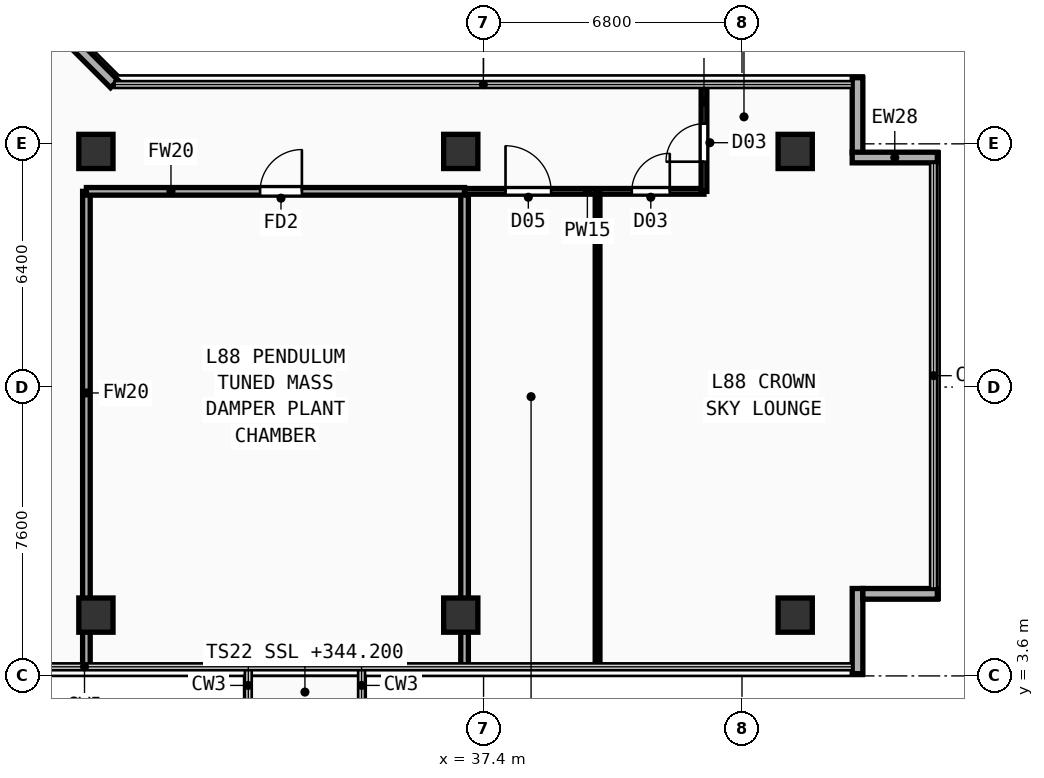
"""IFC4 building model, lengths in metres.
Left out: names, types, materials, properties, quantities, classifications, styles, units other than length and angle.
Written with IfcOpenShell. Run it as: python <this file> out.ifc"""

import sys

from ifc_helpers import new_model, si_unit, direction, frame, frame_2d, origin, origin_2d, place, context, subcontext, project, spatial, rectangle, extrude, element, fill, save


model = new_model("IFC4")
c1 = context("Model", 3, precision=1e-05, world=origin(), true_north=direction((0.0, 1.0)))
c2 = subcontext(c1, "Body", "Model", "MODEL_VIEW")
j1 = project(units=[si_unit("LENGTHUNIT", "METRE"), si_unit("PLANEANGLEUNIT", "RADIAN")], contexts=[c1])
p1 = place(None, origin())
s1 = spatial("IfcSite", under=j1, at=p1, CompositionType="ELEMENT")
p2 = place(p1, origin())
s2 = spatial("IfcBuilding", under=s1, at=p2, CompositionType="ELEMENT")
p3 = place(p2, frame((0.0, 0.0, 344.2)))
s3 = spatial("IfcBuildingStorey", under=s2, at=p3, CompositionType="ELEMENT", Elevation=344.2)
for number, where, z_axis, x_axis in (
    (1, (27.2, 5.2, 0.0), (0.0, 0.0, 1.0), (1.0, 0.0, 0.0)),
    (2, (36.8, 5.2, 0.0), (0.0, 0.0, 1.0), (1.0, 0.0, 0.0)),
    (3, (45.6, 5.2, 0.0), (0.0, 0.0, 1.0), (1.0, 0.0, 0.0)),
    (4, (27.2, 17.4, 0.0), (0.0, 0.0, 1.0), (1.0, 0.0, 0.0)),
    (5, (36.8, 17.4, 0.0), (0.0, 0.0, 1.0), (1.0, 0.0, 0.0)),
    (6, (45.6, 17.4, 0.0), (0.0, 0.0, 1.0), (1.0, 0.0, 0.0)),
):
    element("IfcColumn", number, at=place(p3, frame(where, z_axis=z_axis, x_axis=x_axis)), inside=s3, PredefinedType="COLUMN", context=c2, shape_type="SweptSolid", body=[
        extrude(rectangle(XDim=0.9, YDim=0.9, at=origin_2d()), origin(), (0.0, 0.0, 1.0), 3.66),
    ])
p4 = place(p3, frame((47.24, 3.66, 0.0), z_axis=(0.0, 0.0, 1.0), x_axis=(0.0, 1.0, 0.0)))
e7 = element("IfcWall", 7, at=p4, inside=s3, PredefinedType="SOLIDWALL", context=c2, shape_type="SweptSolid", body=[
    extrude(rectangle(XDim=2.24, YDim=0.28, at=frame_2d((1.12, 0.0))), origin(), (0.0, 0.0, 1.0), 3.66),
])
p5 = place(p3, frame((47.38, 5.76, 0.0), z_axis=(0.0, 0.0, 1.0), x_axis=(1.0, 0.0, 0.0)))
e8 = element("IfcWall", 8, at=p5, inside=s3, PredefinedType="SOLIDWALL", context=c2, shape_type="SweptSolid", body=[
    extrude(rectangle(XDim=1.96, YDim=0.28, at=frame_2d((0.98, 0.0))), origin(), (0.0, 0.0, 1.0), 3.66),
])
p6 = place(p3, frame((47.24, 17.365, 0.0), z_axis=(0.0, 0.0, 1.0), x_axis=(0.0, 1.0, 0.0)))
e9 = element("IfcWall", 9, at=p6, inside=s3, PredefinedType="SOLIDWALL", context=c2, shape_type="SweptSolid", body=[
    extrude(rectangle(XDim=1.975, YDim=0.28, at=frame_2d((0.988, 0.0))), origin(), (0.0, 0.0, 1.0), 3.66),
])
p7 = place(p3, frame((47.1, 17.24, 0.0), z_axis=(0.0, 0.0, 1.0), x_axis=(1.0, 0.0, 0.0)))
e10 = element("IfcWall", 10, at=p7, inside=s3, PredefinedType="SOLIDWALL", context=c2, shape_type="SweptSolid", body=[
    extrude(rectangle(XDim=2.24, YDim=0.28, at=frame_2d((1.12, 0.0))), origin(), (0.0, 0.0, 1.0), 3.66),
])
p8 = place(p3, frame((27.685, 19.175, 0.0), z_axis=(0.0, 0.0, 1.0), x_axis=(-0.707106781187, 0.707106781187, 0.0)))
e11 = element("IfcWall", 11, at=p8, inside=s3, PredefinedType="SOLIDWALL", context=c2, shape_type="SweptSolid", body=[
    extrude(rectangle(XDim=9.207, YDim=0.28, at=frame_2d((4.603, 0.0))), origin(), (0.0, 0.0, 1.0), 3.66),
])
for number, where, z_axis, x_axis in (
    (12, (26.95, 3.85, 0.0), (0.0, 0.0, 1.0), (0.0, 1.0, 0.0)),
    (13, (36.9, 3.85, 0.0), (0.0, 0.0, 1.0), (0.0, 1.0, 0.0)),
):
    element("IfcWall", number, at=place(p3, frame(where, z_axis=z_axis, x_axis=x_axis)), inside=s3, PredefinedType="PARTITIONING", context=c2, shape_type="SweptSolid", body=[
        extrude(rectangle(XDim=12.5, YDim=0.2, at=frame_2d((6.25, 0.0))), origin(), (0.0, 0.0, 1.0), 2.86),
    ])
p9 = place(p3, frame((26.95, 16.35, 0.0), z_axis=(0.0, 0.0, 1.0), x_axis=(1.0, 0.0, 0.0)))
e14 = element("IfcWall", 14, at=p9, inside=s3, PredefinedType="PARTITIONING", context=c2, shape_type="SweptSolid", body=[
    extrude(rectangle(XDim=9.95, YDim=0.2, at=frame_2d((4.975, 0.0))), origin(), (0.0, 0.0, 1.0), 3.66),
])
p10 = place(p9, frame((4.57, 0.0, 0.0)))
e15 = element("IfcOpeningElement", 15, at=p10, cuts=e14, PredefinedType="OPENING", context=c2, shape_type="SweptSolid", body=[
    extrude(rectangle(XDim=1.1, YDim=2.2, at=frame_2d((0.55, 1.1))), frame((0.0, 0.11, 0.0), z_axis=(0.0, -1.0, 0.0), x_axis=(1.0, 0.0, 0.0)), (0.0, 0.0, 1.0), 0.22),
])
p11 = place(p3, frame((36.9, 16.35, 0.0), z_axis=(0.0, 0.0, 1.0), x_axis=(1.0, 0.0, 0.0)))
e16 = element("IfcWall", 16, at=p11, inside=s3, PredefinedType="PARTITIONING", context=c2, shape_type="SweptSolid", body=[
    extrude(rectangle(XDim=6.3, YDim=0.15, at=frame_2d((3.15, 0.0))), origin(), (0.0, 0.0, 1.0), 3.66),
])
p12 = place(p11, frame((1.078, 0.0, 0.0)))
e17 = element("IfcOpeningElement", 17, at=p12, cuts=e16, PredefinedType="OPENING", context=c2, shape_type="SweptSolid", body=[
    extrude(rectangle(XDim=1.2, YDim=2.25, at=frame_2d((0.6, 1.125))), frame((0.0, 0.085, 0.0), z_axis=(0.0, -1.0, 0.0), x_axis=(1.0, 0.0, 0.0)), (0.0, 0.0, 1.0), 0.17),
])
p13 = place(p11, frame((4.4, 0.0, 0.0)))
e18 = element("IfcOpeningElement", 18, at=p13, cuts=e16, PredefinedType="OPENING", context=c2, shape_type="SweptSolid", body=[
    extrude(rectangle(XDim=1.0, YDim=2.2, at=frame_2d((0.5, 1.1))), frame((0.0, 0.085, 0.0), z_axis=(0.0, -1.0, 0.0), x_axis=(1.0, 0.0, 0.0)), (0.0, 0.0, 1.0), 0.17),
])
p14 = place(p3, frame((43.2, 16.35, 0.0), z_axis=(0.0, 0.0, 1.0), x_axis=(0.0, 1.0, 0.0)))
e19 = element("IfcWall", 19, at=p14, inside=s3, PredefinedType="PARTITIONING", context=c2, shape_type="SweptSolid", body=[
    extrude(rectangle(XDim=2.8, YDim=0.15, at=frame_2d((1.4, 0.0))), origin(), (0.0, 0.0, 1.0), 3.66),
])
p15 = place(p14, frame((0.78, 0.0, 0.0)))
e20 = element("IfcOpeningElement", 20, at=p15, cuts=e19, PredefinedType="OPENING", context=c2, shape_type="SweptSolid", body=[
    extrude(rectangle(XDim=1.0, YDim=2.2, at=frame_2d((0.5, 1.1))), frame((0.0, 0.085, 0.0), z_axis=(0.0, -1.0, 0.0), x_axis=(1.0, 0.0, 0.0)), (0.0, 0.0, 1.0), 0.17),
])
p16 = place(p3, frame((40.4, 3.85, 0.0), z_axis=(0.0, 0.0, 1.0), x_axis=(0.0, 1.0, 0.0)))
e21 = element("IfcWall", 21, at=p16, inside=s3, PredefinedType="PARTITIONING", context=c2, shape_type="SweptSolid", body=[
    extrude(rectangle(XDim=12.5, YDim=0.125, at=frame_2d((6.25, 0.0))), origin(), (0.0, 0.0, 1.0), 3.66),
])
p17 = place(p10, origin())
e22 = element("IfcDoor", 22, at=p17, inside=s3, OperationType="SINGLE_SWING_RIGHT", PredefinedType="DOOR", context=c2, shape_type="SweptSolid", body=[
    extrude(rectangle(XDim=1.1, YDim=2.2, at=frame_2d((0.55, 1.1))), frame((0.0, 0.025, 0.0), z_axis=(0.0, -1.0, 0.0), x_axis=(1.0, 0.0, 0.0)), (0.0, 0.0, 1.0), 0.05),
])
fill(e15, e22)
p18 = place(p12, origin())
e23 = element("IfcDoor", 23, at=p18, inside=s3, OperationType="SINGLE_SWING_LEFT", PredefinedType="DOOR", context=c2, shape_type="SweptSolid", body=[
    extrude(rectangle(XDim=1.2, YDim=2.25, at=frame_2d((0.6, 1.125))), frame((0.0, 0.025, 0.0), z_axis=(0.0, -1.0, 0.0), x_axis=(1.0, 0.0, 0.0)), (0.0, 0.0, 1.0), 0.05),
])
fill(e17, e23)
p19 = place(p13, origin())
e24 = element("IfcDoor", 24, at=p19, inside=s3, OperationType="SINGLE_SWING_RIGHT", PredefinedType="DOOR", context=c2, shape_type="SweptSolid", body=[
    extrude(rectangle(XDim=1.0, YDim=2.2, at=frame_2d((0.5, 1.1))), frame((0.0, 0.025, 0.0), z_axis=(0.0, -1.0, 0.0), x_axis=(1.0, 0.0, 0.0)), (0.0, 0.0, 1.0), 0.05),
])
fill(e18, e24)
p20 = place(p15, origin())
e25 = element("IfcDoor", 25, at=p20, inside=s3, OperationType="SINGLE_SWING_LEFT", PredefinedType="DOOR", context=c2, shape_type="SweptSolid", body=[
    extrude(rectangle(XDim=1.0, YDim=2.2, at=frame_2d((0.5, 1.1))), frame((0.0, 0.025, 0.0), z_axis=(0.0, -1.0, 0.0), x_axis=(1.0, 0.0, 0.0)), (0.0, 0.0, 1.0), 0.05),
])
fill(e20, e25)
save(model, sys.argv[1])
